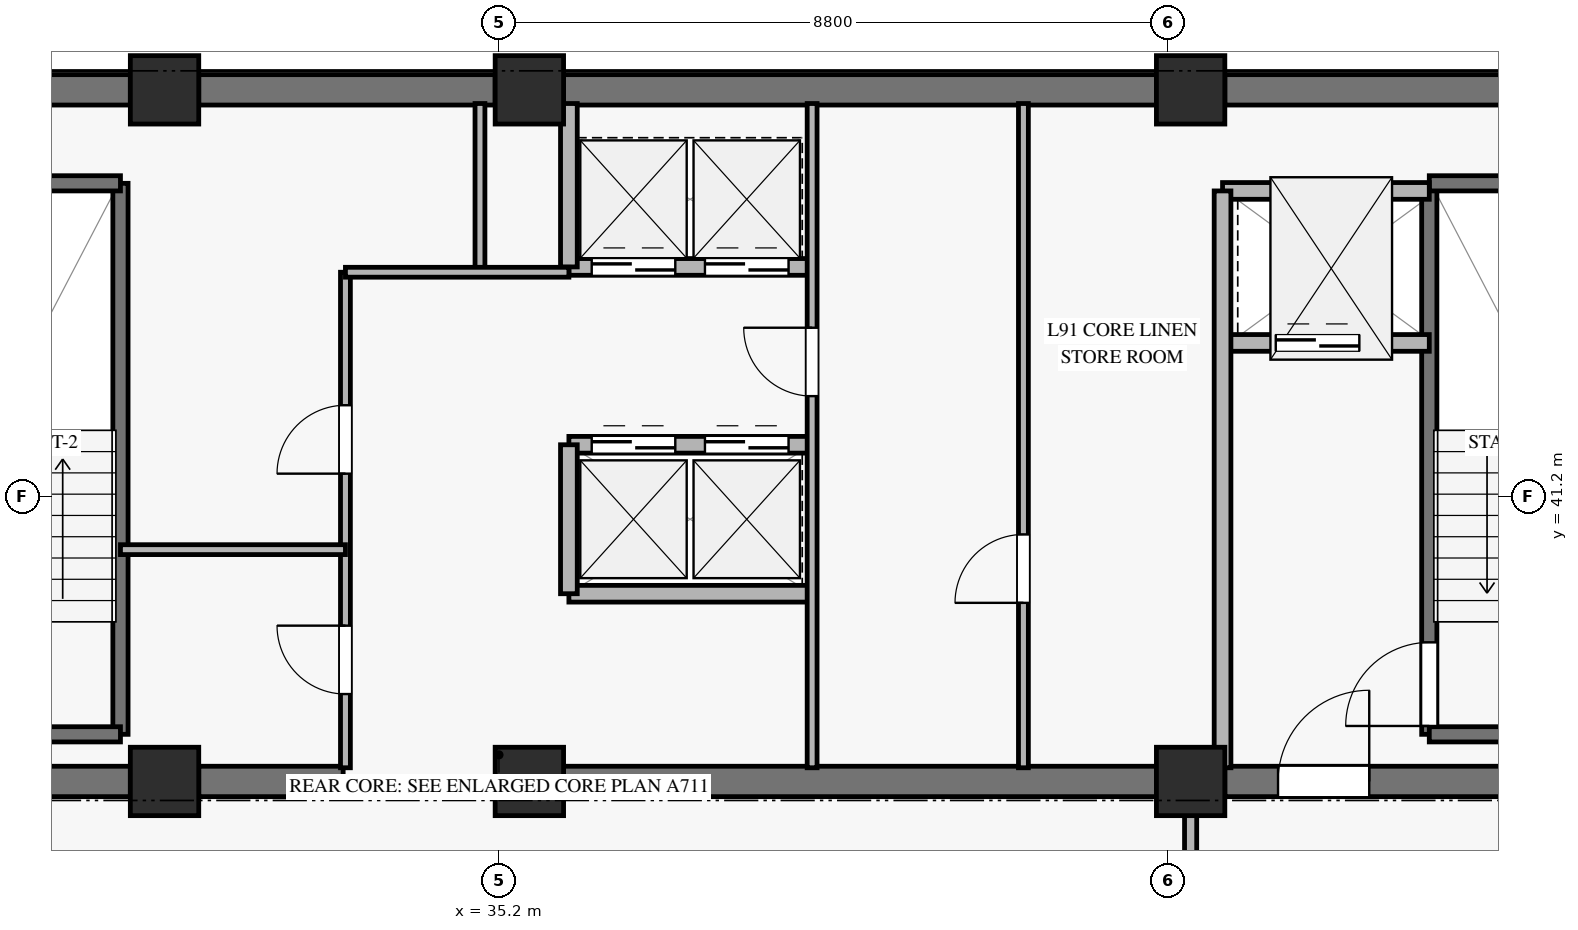
"""IFC4 building model, lengths in metres.
Left out: names, types, materials, properties, quantities, classifications, styles, units other than length and angle.
Written with IfcOpenShell. Run it as: python <this file> out.ifc"""

import sys

from ifc_helpers import new_model, si_unit, direction, frame, frame_2d, origin, origin_2d, place, context, subcontext, project, spatial, rectangle, extrude, source, transform, mapped, element, fill, save


model = new_model("IFC4")
c1 = context("Model", 3, precision=1e-05, world=origin(), true_north=direction((0.0, 1.0)))
c2 = subcontext(c1, "Body", "Model", "MODEL_VIEW")
j1 = project(units=[si_unit("LENGTHUNIT", "METRE"), si_unit("PLANEANGLEUNIT", "RADIAN")], contexts=[c1])
p1 = place(None, origin())
s1 = spatial("IfcSite", under=j1, at=p1, CompositionType="ELEMENT")
p2 = place(p1, origin())
s2 = spatial("IfcBuilding", under=s1, at=p2, CompositionType="ELEMENT")
p3 = place(p2, frame((0.0, 0.0, 349.3)))
s3 = spatial("IfcBuildingStorey", under=s2, at=p3, CompositionType="ELEMENT", Elevation=349.3)
m1 = source(origin(), c2, "Body", "SweptSolid", [
    extrude(rectangle(XDim=0.9, YDim=0.9, at=origin_2d()), origin(), (0.0, 0.0, 1.0), 3.08),
])
for number, where, z_axis, x_axis in (
    (1, (30.8, 37.45, 0.0), (0.0, 0.0, 1.0), (1.0, 0.0, 0.0)),
    (2, (30.8, 46.55, 0.0), (0.0, 0.0, 1.0), (1.0, 0.0, 0.0)),
    (3, (35.6, 37.45, 0.0), (0.0, 0.0, 1.0), (1.0, 0.0, 0.0)),
    (4, (35.6, 46.55, 0.0), (0.0, 0.0, 1.0), (1.0, 0.0, 0.0)),
    (5, (44.3, 37.45, 0.0), (0.0, 0.0, 1.0), (1.0, 0.0, 0.0)),
    (6, (44.3, 46.55, 0.0), (0.0, 0.0, 1.0), (1.0, 0.0, 0.0)),
):
    element("IfcColumn", number, at=place(p3, frame(where, z_axis=z_axis, x_axis=x_axis)), inside=s3, PredefinedType="PILASTER", context=c2, shape_type="MappedRepresentation", body=[
        mapped(m1, transform((0.0, 0.0, 0.0), x_axis=(1.0, 0.0, 0.0), y_axis=(0.0, 1.0, 0.0), z_axis=(0.0, 0.0, 1.0), scale=1.0)),
    ])
p4 = place(p3, frame((20.3, 46.55, 0.0), z_axis=(0.0, 0.0, 1.0), x_axis=(1.0, 0.0, 0.0)))
e7 = element("IfcWall", 7, at=p4, inside=s3, PredefinedType="SHEAR", context=c2, shape_type="SweptSolid", body=[
    extrude(rectangle(XDim=10.05, YDim=0.4, at=frame_2d((5.025, 0.0))), origin(), (0.0, 0.0, 1.0), 3.08),
])
p5 = place(p3, frame((31.25, 46.55, 0.0), z_axis=(0.0, 0.0, 1.0), x_axis=(1.0, 0.0, 0.0)))
e8 = element("IfcWall", 8, at=p5, inside=s3, PredefinedType="SHEAR", context=c2, shape_type="SweptSolid", body=[
    extrude(rectangle(XDim=3.9, YDim=0.4, at=frame_2d((1.95, 0.0))), origin(), (0.0, 0.0, 1.0), 3.08),
])
p6 = place(p3, frame((36.05, 46.55, 0.0), z_axis=(0.0, 0.0, 1.0), x_axis=(1.0, 0.0, 0.0)))
e9 = element("IfcWall", 9, at=p6, inside=s3, PredefinedType="SHEAR", context=c2, shape_type="SweptSolid", body=[
    extrude(rectangle(XDim=7.8, YDim=0.4, at=frame_2d((3.9, 0.0))), origin(), (0.0, 0.0, 1.0), 3.08),
])
p7 = place(p3, frame((44.75, 46.55, 0.0), z_axis=(0.0, 0.0, 1.0), x_axis=(1.0, 0.0, 0.0)))
e10 = element("IfcWall", 10, at=p7, inside=s3, PredefinedType="SHEAR", context=c2, shape_type="SweptSolid", body=[
    extrude(rectangle(XDim=5.35, YDim=0.4, at=frame_2d((2.675, 0.0))), origin(), (0.0, 0.0, 1.0), 3.08),
])
p8 = place(p3, frame((20.3, 37.45, 0.0), z_axis=(0.0, 0.0, 1.0), x_axis=(1.0, 0.0, 0.0)))
e11 = element("IfcWall", 11, at=p8, inside=s3, PredefinedType="SHEAR", context=c2, shape_type="SweptSolid", body=[
    extrude(rectangle(XDim=10.05, YDim=0.4, at=frame_2d((5.025, 0.0))), origin(), (0.0, 0.0, 1.0), 3.08),
])
p9 = place(p8, frame((4.25, 0.0, 0.0)))
e12 = element("IfcOpeningElement", 12, at=p9, cuts=e11, PredefinedType="OPENING", context=c2, shape_type="SweptSolid", body=[
    extrude(rectangle(XDim=1.2, YDim=2.15, at=frame_2d((0.6, 1.075))), frame((0.0, 0.21, 0.0), z_axis=(0.0, -1.0, 0.0), x_axis=(1.0, 0.0, 0.0)), (0.0, 0.0, 1.0), 0.42),
])
p10 = place(p3, frame((31.25, 37.45, 0.0), z_axis=(0.0, 0.0, 1.0), x_axis=(1.0, 0.0, 0.0)))
e13 = element("IfcWall", 13, at=p10, inside=s3, PredefinedType="SHEAR", context=c2, shape_type="SweptSolid", body=[
    extrude(rectangle(XDim=1.9, YDim=0.4, at=frame_2d((0.95, 0.0))), origin(), (0.0, 0.0, 1.0), 3.08),
])
p11 = place(p3, frame((36.05, 37.45, 0.0), z_axis=(0.0, 0.0, 1.0), x_axis=(1.0, 0.0, 0.0)))
e14 = element("IfcWall", 14, at=p11, inside=s3, PredefinedType="SHEAR", context=c2, shape_type="SweptSolid", body=[
    extrude(rectangle(XDim=7.8, YDim=0.4, at=frame_2d((3.9, 0.0))), origin(), (0.0, 0.0, 1.0), 3.08),
])
p12 = place(p3, frame((44.75, 37.45, 0.0), z_axis=(0.0, 0.0, 1.0), x_axis=(1.0, 0.0, 0.0)))
e15 = element("IfcWall", 15, at=p12, inside=s3, PredefinedType="SHEAR", context=c2, shape_type="SweptSolid", body=[
    extrude(rectangle(XDim=5.35, YDim=0.4, at=frame_2d((2.675, 0.0))), origin(), (0.0, 0.0, 1.0), 3.08),
])
p13 = place(p12, frame((0.7, 0.0, 0.0)))
e16 = element("IfcOpeningElement", 16, at=p13, cuts=e15, PredefinedType="OPENING", context=c2, shape_type="SweptSolid", body=[
    extrude(rectangle(XDim=1.2, YDim=2.15, at=frame_2d((0.6, 1.075))), frame((0.0, 0.21, 0.0), z_axis=(0.0, -1.0, 0.0), x_axis=(1.0, 0.0, 0.0)), (0.0, 0.0, 1.0), 0.42),
])
p14 = place(p3, frame((30.22, 38.07, 0.0), z_axis=(0.0, 0.0, 1.0), x_axis=(0.0, 1.0, 0.0)))
e17 = element("IfcWall", 17, at=p14, inside=s3, PredefinedType="SOLIDWALL", context=c2, shape_type="SweptSolid", body=[
    extrude(rectangle(XDim=7.25, YDim=0.2, at=frame_2d((3.625, 0.0))), origin(), (0.0, 0.0, 1.0), 3.4),
])
for number, where, z_axis, x_axis in (
    (18, (27.14, 45.32, 0.0), (0.0, 0.0, 1.0), (1.0, 0.0, 0.0)),
    (19, (27.14, 38.07, 0.0), (0.0, 0.0, 1.0), (1.0, 0.0, 0.0)),
):
    element("IfcWall", number, at=place(p3, frame(where, z_axis=z_axis, x_axis=x_axis)), inside=s3, PredefinedType="SOLIDWALL", context=c2, shape_type="SweptSolid", body=[
        extrude(rectangle(XDim=3.08, YDim=0.2, at=frame_2d((1.54, 0.0))), origin(), (0.0, 0.0, 1.0), 3.4),
    ])
p15 = place(p3, frame((47.44, 38.07, 0.0), z_axis=(0.0, 0.0, 1.0), x_axis=(0.0, 1.0, 0.0)))
e20 = element("IfcWall", 20, at=p15, inside=s3, PredefinedType="SOLIDWALL", context=c2, shape_type="SweptSolid", body=[
    extrude(rectangle(XDim=7.25, YDim=0.2, at=frame_2d((3.625, 0.0))), origin(), (0.0, 0.0, 1.0), 3.4),
])
p16 = place(p15, frame((0.11, 0.0, 0.0)))
e21 = element("IfcOpeningElement", 21, at=p16, cuts=e20, PredefinedType="OPENING", context=c2, shape_type="SweptSolid", body=[
    extrude(rectangle(XDim=1.1, YDim=2.15, at=frame_2d((0.55, 1.075))), frame((0.0, 0.11, 0.0), z_axis=(0.0, -1.0, 0.0), x_axis=(1.0, 0.0, 0.0)), (0.0, 0.0, 1.0), 0.22),
])
for number, where, z_axis, x_axis in (
    (22, (47.44, 45.32, 0.0), (0.0, 0.0, 1.0), (1.0, 0.0, 0.0)),
    (23, (47.44, 38.07, 0.0), (0.0, 0.0, 1.0), (1.0, 0.0, 0.0)),
):
    element("IfcWall", number, at=place(p3, frame(where, z_axis=z_axis, x_axis=x_axis)), inside=s3, PredefinedType="SOLIDWALL", context=c2, shape_type="SweptSolid", body=[
        extrude(rectangle(XDim=2.93, YDim=0.2, at=frame_2d((1.465, 0.0))), origin(), (0.0, 0.0, 1.0), 3.4),
    ])
p17 = place(p3, frame((44.72, 43.22, 0.0), z_axis=(0.0, 0.0, 1.0), x_axis=(1.0, 0.0, 0.0)))
e24 = element("IfcWall", 24, at=p17, inside=s3, PredefinedType="SOLIDWALL", context=c2, shape_type="SweptSolid", body=[
    extrude(rectangle(XDim=2.72, YDim=0.22, at=frame_2d((1.36, 0.0))), origin(), (0.0, 0.0, 1.0), 3.08),
])
p18 = place(p17, frame((0.7, 0.0, 0.0)))
e25 = element("IfcOpeningElement", 25, at=p18, cuts=e24, PredefinedType="OPENING", context=c2, shape_type="SweptSolid", body=[
    extrude(rectangle(XDim=1.1, YDim=2.2, at=frame_2d((0.55, 1.1))), frame((0.0, 0.12, 0.0), z_axis=(0.0, -1.0, 0.0), x_axis=(1.0, 0.0, 0.0)), (0.0, 0.0, 1.0), 0.24),
])
p19 = place(p3, frame((44.72, 45.22, 0.0), z_axis=(0.0, 0.0, 1.0), x_axis=(1.0, 0.0, 0.0)))
e26 = element("IfcWall", 26, at=p19, inside=s3, PredefinedType="SOLIDWALL", context=c2, shape_type="SweptSolid", body=[
    extrude(rectangle(XDim=2.72, YDim=0.22, at=frame_2d((1.36, 0.0))), origin(), (0.0, 0.0, 1.0), 3.08),
])
p20 = place(p3, frame((44.72, 37.63, 0.0), z_axis=(0.0, 0.0, 1.0), x_axis=(0.0, 1.0, 0.0)))
e27 = element("IfcWall", 27, at=p20, inside=s3, PredefinedType="SOLIDWALL", context=c2, shape_type="SweptSolid", body=[
    extrude(rectangle(XDim=7.59, YDim=0.22, at=frame_2d((3.795, 0.0))), origin(), (0.0, 0.0, 1.0), 3.08),
])
p21 = place(p3, frame((36.12, 44.22, 0.0), z_axis=(0.0, 0.0, 1.0), x_axis=(1.0, 0.0, 0.0)))
e28 = element("IfcWall", 28, at=p21, inside=s3, PredefinedType="SOLIDWALL", context=c2, shape_type="SweptSolid", body=[
    extrude(rectangle(XDim=3.2, YDim=0.22, at=frame_2d((1.6, 0.0))), origin(), (0.0, 0.0, 1.0), 3.08),
])
p22 = place(p21, frame((0.3, 0.0, 0.0)))
e29 = element("IfcOpeningElement", 29, at=p22, cuts=e28, PredefinedType="OPENING", context=c2, shape_type="SweptSolid", body=[
    extrude(rectangle(XDim=1.1, YDim=2.2, at=frame_2d((0.55, 1.1))), frame((0.0, 0.12, 0.0), z_axis=(0.0, -1.0, 0.0), x_axis=(1.0, 0.0, 0.0)), (0.0, 0.0, 1.0), 0.24),
])
p23 = place(p21, frame((1.79, 0.0, 0.0)))
e30 = element("IfcOpeningElement", 30, at=p23, cuts=e28, PredefinedType="OPENING", context=c2, shape_type="SweptSolid", body=[
    extrude(rectangle(XDim=1.1, YDim=2.2, at=frame_2d((0.55, 1.1))), frame((0.0, 0.12, 0.0), z_axis=(0.0, -1.0, 0.0), x_axis=(1.0, 0.0, 0.0)), (0.0, 0.0, 1.0), 0.24),
])
p24 = place(p3, frame((36.12, 41.88, 0.0), z_axis=(0.0, 0.0, 1.0), x_axis=(1.0, 0.0, 0.0)))
e31 = element("IfcWall", 31, at=p24, inside=s3, PredefinedType="SOLIDWALL", context=c2, shape_type="SweptSolid", body=[
    extrude(rectangle(XDim=3.2, YDim=0.22, at=frame_2d((1.6, 0.0))), origin(), (0.0, 0.0, 1.0), 3.08),
])
p25 = place(p24, frame((0.3, 0.0, 0.0)))
e32 = element("IfcOpeningElement", 32, at=p25, cuts=e31, PredefinedType="OPENING", context=c2, shape_type="SweptSolid", body=[
    extrude(rectangle(XDim=1.1, YDim=2.2, at=frame_2d((0.55, 1.1))), frame((0.0, 0.12, 0.0), z_axis=(0.0, -1.0, 0.0), x_axis=(1.0, 0.0, 0.0)), (0.0, 0.0, 1.0), 0.24),
])
p26 = place(p24, frame((1.79, 0.0, 0.0)))
e33 = element("IfcOpeningElement", 33, at=p26, cuts=e31, PredefinedType="OPENING", context=c2, shape_type="SweptSolid", body=[
    extrude(rectangle(XDim=1.1, YDim=2.2, at=frame_2d((0.55, 1.1))), frame((0.0, 0.12, 0.0), z_axis=(0.0, -1.0, 0.0), x_axis=(1.0, 0.0, 0.0)), (0.0, 0.0, 1.0), 0.24),
])
p27 = place(p3, frame((36.12, 39.92, 0.0), z_axis=(0.0, 0.0, 1.0), x_axis=(1.0, 0.0, 0.0)))
e34 = element("IfcWall", 34, at=p27, inside=s3, PredefinedType="SOLIDWALL", context=c2, shape_type="SweptSolid", body=[
    extrude(rectangle(XDim=3.2, YDim=0.22, at=frame_2d((1.6, 0.0))), origin(), (0.0, 0.0, 1.0), 3.08),
])
p28 = place(p3, frame((36.12, 39.92, 0.0), z_axis=(0.0, 0.0, 1.0), x_axis=(0.0, 1.0, 0.0)))
e35 = element("IfcWall", 35, at=p28, inside=s3, PredefinedType="SOLIDWALL", context=c2, shape_type="SweptSolid", body=[
    extrude(rectangle(XDim=1.96, YDim=0.22, at=frame_2d((0.98, 0.0))), origin(), (0.0, 0.0, 1.0), 3.08),
])
p29 = place(p3, frame((36.12, 44.22, 0.0), z_axis=(0.0, 0.0, 1.0), x_axis=(0.0, 1.0, 0.0)))
e36 = element("IfcWall", 36, at=p29, inside=s3, PredefinedType="SOLIDWALL", context=c2, shape_type="SweptSolid", body=[
    extrude(rectangle(XDim=2.15, YDim=0.22, at=frame_2d((1.075, 0.0))), origin(), (0.0, 0.0, 1.0), 3.08),
])
p30 = place(p3, frame((33.18, 37.63, 0.0), z_axis=(0.0, 0.0, 1.0), x_axis=(0.0, 1.0, 0.0)))
e37 = element("IfcWall", 37, at=p30, inside=s3, PredefinedType="PARTITIONING", context=c2, shape_type="SweptSolid", body=[
    extrude(rectangle(XDim=6.52, YDim=0.13, at=frame_2d((3.26, 0.0))), origin(), (0.0, 0.0, 1.0), 2.22),
])
p31 = place(p30, frame((0.97, 0.0, 0.0)))
e38 = element("IfcOpeningElement", 38, at=p31, cuts=e37, PredefinedType="OPENING", context=c2, shape_type="SweptSolid", body=[
    extrude(rectangle(XDim=0.9, YDim=2.1, at=frame_2d((0.45, 1.05))), frame((0.0, 0.075, 0.0), z_axis=(0.0, -1.0, 0.0), x_axis=(1.0, 0.0, 0.0)), (0.0, 0.0, 1.0), 0.15),
])
p32 = place(p30, frame((3.87, 0.0, 0.0)))
e39 = element("IfcOpeningElement", 39, at=p32, cuts=e37, PredefinedType="OPENING", context=c2, shape_type="SweptSolid", body=[
    extrude(rectangle(XDim=0.9, YDim=2.1, at=frame_2d((0.45, 1.05))), frame((0.0, 0.075, 0.0), z_axis=(0.0, -1.0, 0.0), x_axis=(1.0, 0.0, 0.0)), (0.0, 0.0, 1.0), 0.15),
])
p33 = place(p3, frame((34.95, 44.15, 0.0), z_axis=(0.0, 0.0, 1.0), x_axis=(0.0, 1.0, 0.0)))
e40 = element("IfcWall", 40, at=p33, inside=s3, PredefinedType="PARTITIONING", context=c2, shape_type="SweptSolid", body=[
    extrude(rectangle(XDim=2.22, YDim=0.13, at=frame_2d((1.11, 0.0))), origin(), (0.0, 0.0, 1.0), 3.08),
])
p34 = place(p3, frame((33.18, 44.15, 0.0), z_axis=(0.0, 0.0, 1.0), x_axis=(1.0, 0.0, 0.0)))
e41 = element("IfcWall", 41, at=p34, inside=s3, PredefinedType="PARTITIONING", context=c2, shape_type="SweptSolid", body=[
    extrude(rectangle(XDim=2.94, YDim=0.13, at=frame_2d((1.47, 0.0))), origin(), (0.0, 0.0, 1.0), 2.365),
])
p35 = place(p3, frame((39.32, 37.63, 0.0), z_axis=(0.0, 0.0, 1.0), x_axis=(0.0, 1.0, 0.0)))
e42 = element("IfcWall", 42, at=p35, inside=s3, PredefinedType="PARTITIONING", context=c2, shape_type="SweptSolid", body=[
    extrude(rectangle(XDim=8.74, YDim=0.13, at=frame_2d((4.37, 0.0))), origin(), (0.0, 0.0, 1.0), 3.08),
])
p36 = place(p35, frame((4.89, 0.0, 0.0)))
e43 = element("IfcOpeningElement", 43, at=p36, cuts=e42, PredefinedType="OPENING", context=c2, shape_type="SweptSolid", body=[
    extrude(rectangle(XDim=0.9, YDim=2.1, at=frame_2d((0.45, 1.05))), frame((0.0, 0.075, 0.0), z_axis=(0.0, -1.0, 0.0), x_axis=(1.0, 0.0, 0.0)), (0.0, 0.0, 1.0), 0.15),
])
p37 = place(p3, frame((30.22, 40.5, 0.0), z_axis=(0.0, 0.0, 1.0), x_axis=(1.0, 0.0, 0.0)))
e44 = element("IfcWall", 44, at=p37, inside=s3, PredefinedType="PARTITIONING", context=c2, shape_type="SweptSolid", body=[
    extrude(rectangle(XDim=2.96, YDim=0.13, at=frame_2d((1.48, 0.0))), origin(), (0.0, 0.0, 1.0), 2.365),
])
p38 = place(p3, frame((42.1, 37.63, 0.0), z_axis=(0.0, 0.0, 1.0), x_axis=(0.0, 1.0, 0.0)))
e45 = element("IfcWall", 45, at=p38, inside=s3, PredefinedType="PARTITIONING", context=c2, shape_type="SweptSolid", body=[
    extrude(rectangle(XDim=8.74, YDim=0.13, at=frame_2d((4.37, 0.0))), origin(), (0.0, 0.0, 1.0), 3.08),
])
p39 = place(p38, frame((2.17, 0.0, 0.0)))
e46 = element("IfcOpeningElement", 46, at=p39, cuts=e45, PredefinedType="OPENING", context=c2, shape_type="SweptSolid", body=[
    extrude(rectangle(XDim=0.9, YDim=2.1, at=frame_2d((0.45, 1.05))), frame((0.0, 0.075, 0.0), z_axis=(0.0, -1.0, 0.0), x_axis=(1.0, 0.0, 0.0)), (0.0, 0.0, 1.0), 0.15),
])
p40 = place(p3, frame((44.3, 23.5, 0.0), z_axis=(0.0, 0.0, 1.0), x_axis=(0.0, 1.0, 0.0)))
e47 = element("IfcWall", 47, at=p40, inside=s3, PredefinedType="PARTITIONING", context=c2, shape_type="SweptSolid", body=[
    extrude(rectangle(XDim=13.95, YDim=0.16, at=frame_2d((6.975, 0.0))), origin(), (0.0, 0.0, 1.0), 2.365),
])
p41 = place(p40, frame((11.82, 0.0, 0.0)))
e48 = element("IfcOpeningElement", 48, at=p41, cuts=e47, PredefinedType="OPENING", context=c2, shape_type="SweptSolid", body=[
    extrude(rectangle(XDim=1.05, YDim=2.15, at=frame_2d((0.525, 1.075))), frame((0.0, 0.09, 0.0), z_axis=(0.0, -1.0, 0.0), x_axis=(1.0, 0.0, 0.0)), (0.0, 0.0, 1.0), 0.18),
])
m2 = source(origin(), c2, "Body", "SweptSolid", [
    extrude(rectangle(XDim=1.1, YDim=2.15, at=frame_2d((0.55, 1.075))), frame((0.0, 0.025, 0.0), z_axis=(0.0, -1.0, 0.0), x_axis=(1.0, 0.0, 0.0)), (0.0, 0.0, 1.0), 0.05),
])
p42 = place(p16, origin())
e49 = element("IfcDoor", 49, at=p42, inside=s3, OperationType="SINGLE_SWING_LEFT", PredefinedType="DOOR", context=c2, shape_type="MappedRepresentation", body=[
    mapped(m2, transform((0.0, 0.0, 0.0), x_axis=(1.0, 0.0, 0.0), y_axis=(0.0, 1.0, 0.0), z_axis=(0.0, 0.0, 1.0), scale=1.0)),
])
fill(e21, e49)
m3 = source(origin(), c2, "Body", "SweptSolid", [
    extrude(rectangle(XDim=1.1, YDim=2.2, at=frame_2d((0.55, 1.1))), frame((0.0, 0.025, 0.0), z_axis=(0.0, -1.0, 0.0), x_axis=(1.0, 0.0, 0.0)), (0.0, 0.0, 1.0), 0.05),
])
p43 = place(p18, origin())
e50 = element("IfcDoor", 50, at=p43, inside=s3, OperationType="SLIDING_TO_LEFT", PredefinedType="DOOR", context=c2, shape_type="MappedRepresentation", body=[
    mapped(m3, transform((0.0, 0.0, 0.0), x_axis=(1.0, 0.0, 0.0), y_axis=(0.0, 1.0, 0.0), z_axis=(0.0, 0.0, 1.0), scale=1.0)),
])
fill(e25, e50)
m4 = source(origin(), c2, "Body", "SweptSolid", [
    extrude(rectangle(XDim=1.2, YDim=2.15, at=frame_2d((0.6, 1.075))), frame((0.0, 0.025, 0.0), z_axis=(0.0, -1.0, 0.0), x_axis=(1.0, 0.0, 0.0)), (0.0, 0.0, 1.0), 0.05),
])
p44 = place(p13, origin())
e51 = element("IfcDoor", 51, at=p44, inside=s3, OperationType="SINGLE_SWING_RIGHT", PredefinedType="DOOR", context=c2, shape_type="MappedRepresentation", body=[
    mapped(m4, transform((0.0, 0.0, 0.0), x_axis=(1.0, 0.0, 0.0), y_axis=(0.0, 1.0, 0.0), z_axis=(0.0, 0.0, 1.0), scale=1.0)),
])
fill(e16, e51)
p45 = place(p22, origin())
e52 = element("IfcDoor", 52, at=p45, inside=s3, OperationType="SLIDING_TO_LEFT", PredefinedType="DOOR", context=c2, shape_type="MappedRepresentation", body=[
    mapped(m3, transform((0.0, 0.0, 0.0), x_axis=(1.0, 0.0, 0.0), y_axis=(0.0, 1.0, 0.0), z_axis=(0.0, 0.0, 1.0), scale=1.0)),
])
fill(e29, e52)
p46 = place(p23, origin())
e53 = element("IfcDoor", 53, at=p46, inside=s3, OperationType="SLIDING_TO_LEFT", PredefinedType="DOOR", context=c2, shape_type="MappedRepresentation", body=[
    mapped(m3, transform((0.0, 0.0, 0.0), x_axis=(1.0, 0.0, 0.0), y_axis=(0.0, 1.0, 0.0), z_axis=(0.0, 0.0, 1.0), scale=1.0)),
])
fill(e30, e53)
p47 = place(p25, origin())
e54 = element("IfcDoor", 54, at=p47, inside=s3, OperationType="SLIDING_TO_LEFT", PredefinedType="DOOR", context=c2, shape_type="MappedRepresentation", body=[
    mapped(m3, transform((0.0, 0.0, 0.0), x_axis=(1.0, 0.0, 0.0), y_axis=(0.0, 1.0, 0.0), z_axis=(0.0, 0.0, 1.0), scale=1.0)),
])
fill(e32, e54)
p48 = place(p26, origin())
e55 = element("IfcDoor", 55, at=p48, inside=s3, OperationType="SLIDING_TO_LEFT", PredefinedType="DOOR", context=c2, shape_type="MappedRepresentation", body=[
    mapped(m3, transform((0.0, 0.0, 0.0), x_axis=(1.0, 0.0, 0.0), y_axis=(0.0, 1.0, 0.0), z_axis=(0.0, 0.0, 1.0), scale=1.0)),
])
fill(e33, e55)
m5 = source(origin(), c2, "Body", "SweptSolid", [
    extrude(rectangle(XDim=0.9, YDim=2.1, at=frame_2d((0.45, 1.05))), frame((0.0, 0.025, 0.0), z_axis=(0.0, -1.0, 0.0), x_axis=(1.0, 0.0, 0.0)), (0.0, 0.0, 1.0), 0.05),
])
p49 = place(p31, origin())
e56 = element("IfcDoor", 56, at=p49, inside=s3, OperationType="SINGLE_SWING_RIGHT", PredefinedType="DOOR", context=c2, shape_type="MappedRepresentation", body=[
    mapped(m5, transform((0.0, 0.0, 0.0), x_axis=(1.0, 0.0, 0.0), y_axis=(0.0, 1.0, 0.0), z_axis=(0.0, 0.0, 1.0), scale=1.0)),
])
fill(e38, e56)
p50 = place(p32, origin())
e57 = element("IfcDoor", 57, at=p50, inside=s3, OperationType="SINGLE_SWING_LEFT", PredefinedType="DOOR", context=c2, shape_type="MappedRepresentation", body=[
    mapped(m5, transform((0.0, 0.0, 0.0), x_axis=(1.0, 0.0, 0.0), y_axis=(0.0, 1.0, 0.0), z_axis=(0.0, 0.0, 1.0), scale=1.0)),
])
fill(e39, e57)
p51 = place(p36, origin())
e58 = element("IfcDoor", 58, at=p51, inside=s3, OperationType="SINGLE_SWING_RIGHT", PredefinedType="DOOR", context=c2, shape_type="MappedRepresentation", body=[
    mapped(m5, transform((0.0, 0.0, 0.0), x_axis=(1.0, 0.0, 0.0), y_axis=(0.0, 1.0, 0.0), z_axis=(0.0, 0.0, 1.0), scale=1.0)),
])
fill(e43, e58)
p52 = place(p39, origin())
e59 = element("IfcDoor", 59, at=p52, inside=s3, OperationType="SINGLE_SWING_LEFT", PredefinedType="DOOR", context=c2, shape_type="MappedRepresentation", body=[
    mapped(m5, transform((0.0, 0.0, 0.0), x_axis=(1.0, 0.0, 0.0), y_axis=(0.0, 1.0, 0.0), z_axis=(0.0, 0.0, 1.0), scale=1.0)),
])
fill(e46, e59)
save(model, sys.argv[1])
